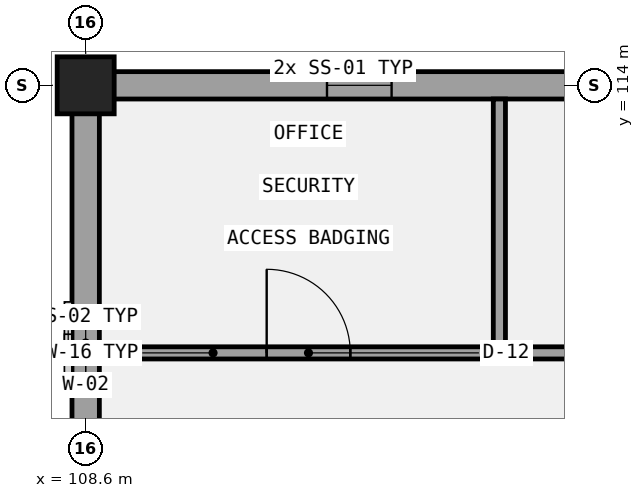
"""IFC4 building model, lengths in metres.
Left out: names, types, materials, properties, quantities, classifications, styles, units other than length and angle.
Written with IfcOpenShell. Run it as: python <this file> out.ifc"""

import sys

from ifc_helpers import new_model, si_unit, direction, frame, frame_2d, origin, origin_2d, place, context, subcontext, project, spatial, rectangle, extrude, element, fill, save


model = new_model("IFC4")
c1 = context("Model", 3, precision=1e-05, world=origin(), true_north=direction((0.0, 1.0)))
c2 = subcontext(c1, "Body", "Model", "MODEL_VIEW")
j1 = project(units=[si_unit("LENGTHUNIT", "METRE"), si_unit("PLANEANGLEUNIT", "RADIAN")], contexts=[c1])
p1 = place(None, origin())
s1 = spatial("IfcSite", under=j1, at=p1, CompositionType="ELEMENT")
p2 = place(p1, origin())
s2 = spatial("IfcBuilding", under=s1, at=p2, CompositionType="ELEMENT")
p3 = place(p2, origin())
s3 = spatial("IfcBuildingStorey", under=s2, at=p3, CompositionType="ELEMENT", Elevation=0.0)
p4 = place(p3, frame((108.6, 114.0, 0.0), z_axis=(0.0, 0.0, 1.0), x_axis=(1.0, 0.0, 0.0)))
e1 = element("IfcColumn", 1, at=p4, inside=s3, PredefinedType="COLUMN", context=c2, shape_type="SweptSolid", body=[
    extrude(rectangle(XDim=0.75, YDim=0.75, at=origin_2d()), origin(), (0.0, 0.0, 1.0), 5.4),
])
p5 = place(p3, frame((144.78, 114.0, 0.0), z_axis=(0.0, 0.0, 1.0), x_axis=(-1.0, 0.0, 0.0)))
e2 = element("IfcWall", 2, at=p5, inside=s3, PredefinedType="SOLIDWALL", context=c2, shape_type="SweptSolid", body=[
    extrude(rectangle(XDim=36.36, YDim=0.36, at=frame_2d((18.18, 0.0))), origin(), (0.0, 0.0, 1.0), 4.37),
])
p6 = place(p5, frame((9.908, 0.0, 0.0)))
e3 = element("IfcOpeningElement", 3, at=p6, cuts=e2, PredefinedType="OPENING", context=c2, shape_type="SweptSolid", body=[
    extrude(rectangle(XDim=2.0, YDim=2.6, at=frame_2d((1.0, 1.3))), frame((0.0, 0.19, 0.0), z_axis=(0.0, -1.0, 0.0), x_axis=(1.0, 0.0, 0.0)), (0.0, 0.0, 1.0), 0.38),
])
p7 = place(p5, frame((32.155, 0.0, 0.95)))
e4 = element("IfcOpeningElement", 4, at=p7, cuts=e2, PredefinedType="OPENING", context=c2, shape_type="SweptSolid", body=[
    extrude(rectangle(XDim=0.85, YDim=1.4, at=frame_2d((0.425, 0.7))), frame((0.0, 0.19, 0.0), z_axis=(0.0, -1.0, 0.0), x_axis=(1.0, 0.0, 0.0)), (0.0, 0.0, 1.0), 0.38),
])
p8 = place(p5, frame((24.955, 0.0, 0.95)))
e5 = element("IfcOpeningElement", 5, at=p8, cuts=e2, PredefinedType="OPENING", context=c2, shape_type="SweptSolid", body=[
    extrude(rectangle(XDim=0.85, YDim=1.65, at=frame_2d((0.425, 0.825))), frame((0.0, 0.19, 0.0), z_axis=(0.0, -1.0, 0.0), x_axis=(1.0, 0.0, 0.0)), (0.0, 0.0, 1.0), 0.38),
])
p9 = place(p5, frame((17.755, 0.0, 0.95)))
e6 = element("IfcOpeningElement", 6, at=p9, cuts=e2, PredefinedType="OPENING", context=c2, shape_type="SweptSolid", body=[
    extrude(rectangle(XDim=0.85, YDim=1.9, at=frame_2d((0.425, 0.95))), frame((0.0, 0.19, 0.0), z_axis=(0.0, -1.0, 0.0), x_axis=(1.0, 0.0, 0.0)), (0.0, 0.0, 1.0), 0.38),
])
p10 = place(p5, frame((3.355, 0.0, 0.95)))
e7 = element("IfcOpeningElement", 7, at=p10, cuts=e2, PredefinedType="OPENING", context=c2, shape_type="SweptSolid", body=[
    extrude(rectangle(XDim=0.85, YDim=2.4, at=frame_2d((0.425, 1.2))), frame((0.0, 0.19, 0.0), z_axis=(0.0, -1.0, 0.0), x_axis=(1.0, 0.0, 0.0)), (0.0, 0.0, 1.0), 0.38),
])
p11 = place(p3, frame((108.6, 113.82, 0.0), z_axis=(0.0, 0.0, 1.0), x_axis=(0.0, -1.0, 0.0)))
e8 = element("IfcWall", 8, at=p11, inside=s3, PredefinedType="SOLIDWALL", context=c2, shape_type="SweptSolid", body=[
    extrude(rectangle(XDim=13.37, YDim=0.36, at=frame_2d((6.685, 0.0))), origin(), (0.0, 0.0, 1.0), 4.12),
])
p12 = place(p11, frame((9.47, 0.0, 0.95)))
e9 = element("IfcOpeningElement", 9, at=p12, cuts=e8, PredefinedType="OPENING", context=c2, shape_type="SweptSolid", body=[
    extrude(rectangle(XDim=0.85, YDim=1.4, at=frame_2d((0.425, 0.7))), frame((0.0, 0.19, 0.0), z_axis=(0.0, -1.0, 0.0), x_axis=(1.0, 0.0, 0.0)), (0.0, 0.0, 1.0), 0.38),
])
p13 = place(p11, frame((2.785, 0.0, 0.95)))
e10 = element("IfcOpeningElement", 10, at=p13, cuts=e8, PredefinedType="OPENING", context=c2, shape_type="SweptSolid", body=[
    extrude(rectangle(XDim=0.85, YDim=1.65, at=frame_2d((0.425, 0.825))), frame((0.0, 0.19, 0.0), z_axis=(0.0, -1.0, 0.0), x_axis=(1.0, 0.0, 0.0)), (0.0, 0.0, 1.0), 0.38),
])
p14 = place(p3, frame((109.02, 110.48, 0.0), z_axis=(0.0, 0.0, 1.0), x_axis=(1.0, 0.0, 0.0)))
e11 = element("IfcWall", 11, at=p14, inside=s3, PredefinedType="PARTITIONING", context=c2, shape_type="SweptSolid", body=[
    extrude(rectangle(XDim=5.023, YDim=0.16, at=frame_2d((2.511, 0.0))), origin(), (0.0, 0.0, 1.0), 4.57),
])
p15 = place(p14, frame((1.961, 0.0, 0.0)))
e12 = element("IfcOpeningElement", 12, at=p15, cuts=e11, PredefinedType="OPENING", context=c2, shape_type="SweptSolid", body=[
    extrude(rectangle(XDim=1.1, YDim=2.35, at=frame_2d((0.55, 1.175))), frame((0.0, 0.09, 0.0), z_axis=(0.0, -1.0, 0.0), x_axis=(1.0, 0.0, 0.0)), (0.0, 0.0, 1.0), 0.18),
])
p16 = place(p3, frame((114.043, 110.48, 0.0), z_axis=(0.0, 0.0, 1.0), x_axis=(0.0, 1.0, 0.0)))
e13 = element("IfcWall", 13, at=p16, inside=s3, PredefinedType="PARTITIONING", context=c2, shape_type="SweptSolid", body=[
    extrude(rectangle(XDim=3.34, YDim=0.16, at=frame_2d((1.67, 0.0))), origin(), (0.0, 0.0, 1.0), 5.12),
])
p17 = place(p3, frame((114.043, 110.48, 0.0), z_axis=(0.0, 0.0, 1.0), x_axis=(1.0, 0.0, 0.0)))
e14 = element("IfcWall", 14, at=p17, inside=s3, PredefinedType="PARTITIONING", context=c2, shape_type="SweptSolid", body=[
    extrude(rectangle(XDim=10.046, YDim=0.16, at=frame_2d((5.023, 0.0))), origin(), (0.0, 0.0, 1.0), 4.57),
])
p18 = place(p17, frame((4.413, 0.0, 0.0)))
e15 = element("IfcOpeningElement", 15, at=p18, cuts=e14, PredefinedType="OPENING", context=c2, shape_type="SweptSolid", body=[
    extrude(rectangle(XDim=1.22, YDim=2.1, at=frame_2d((0.61, 1.05))), frame((0.0, 0.09, 0.0), z_axis=(0.0, -1.0, 0.0), x_axis=(1.0, 0.0, 0.0)), (0.0, 0.0, 1.0), 0.18),
])
p19 = place(p7, origin())
e16 = element("IfcWindow", 16, at=p19, inside=s3, PartitioningType="SINGLE_PANEL", PredefinedType="WINDOW", context=c2, shape_type="SweptSolid", body=[
    extrude(rectangle(XDim=0.85, YDim=1.4, at=frame_2d((0.425, 0.7))), frame((0.0, 0.03, 0.0), z_axis=(0.0, -1.0, 0.0), x_axis=(1.0, 0.0, 0.0)), (0.0, 0.0, 1.0), 0.06),
])
fill(e4, e16)
p20 = place(p13, origin())
e17 = element("IfcWindow", 17, at=p20, inside=s3, PartitioningType="SINGLE_PANEL", PredefinedType="WINDOW", context=c2, shape_type="SweptSolid", body=[
    extrude(rectangle(XDim=0.85, YDim=1.65, at=frame_2d((0.425, 0.825))), frame((0.0, 0.03, 0.0), z_axis=(0.0, -1.0, 0.0), x_axis=(1.0, 0.0, 0.0)), (0.0, 0.0, 1.0), 0.06),
])
fill(e10, e17)
p21 = place(p15, origin())
e18 = element("IfcDoor", 18, at=p21, inside=s3, OperationType="SINGLE_SWING_LEFT", PredefinedType="DOOR", context=c2, shape_type="SweptSolid", body=[
    extrude(rectangle(XDim=1.1, YDim=2.35, at=frame_2d((0.55, 1.175))), frame((0.0, 0.025, 0.0), z_axis=(0.0, -1.0, 0.0), x_axis=(1.0, 0.0, 0.0)), (0.0, 0.0, 1.0), 0.05),
])
fill(e12, e18)
save(model, sys.argv[1])
